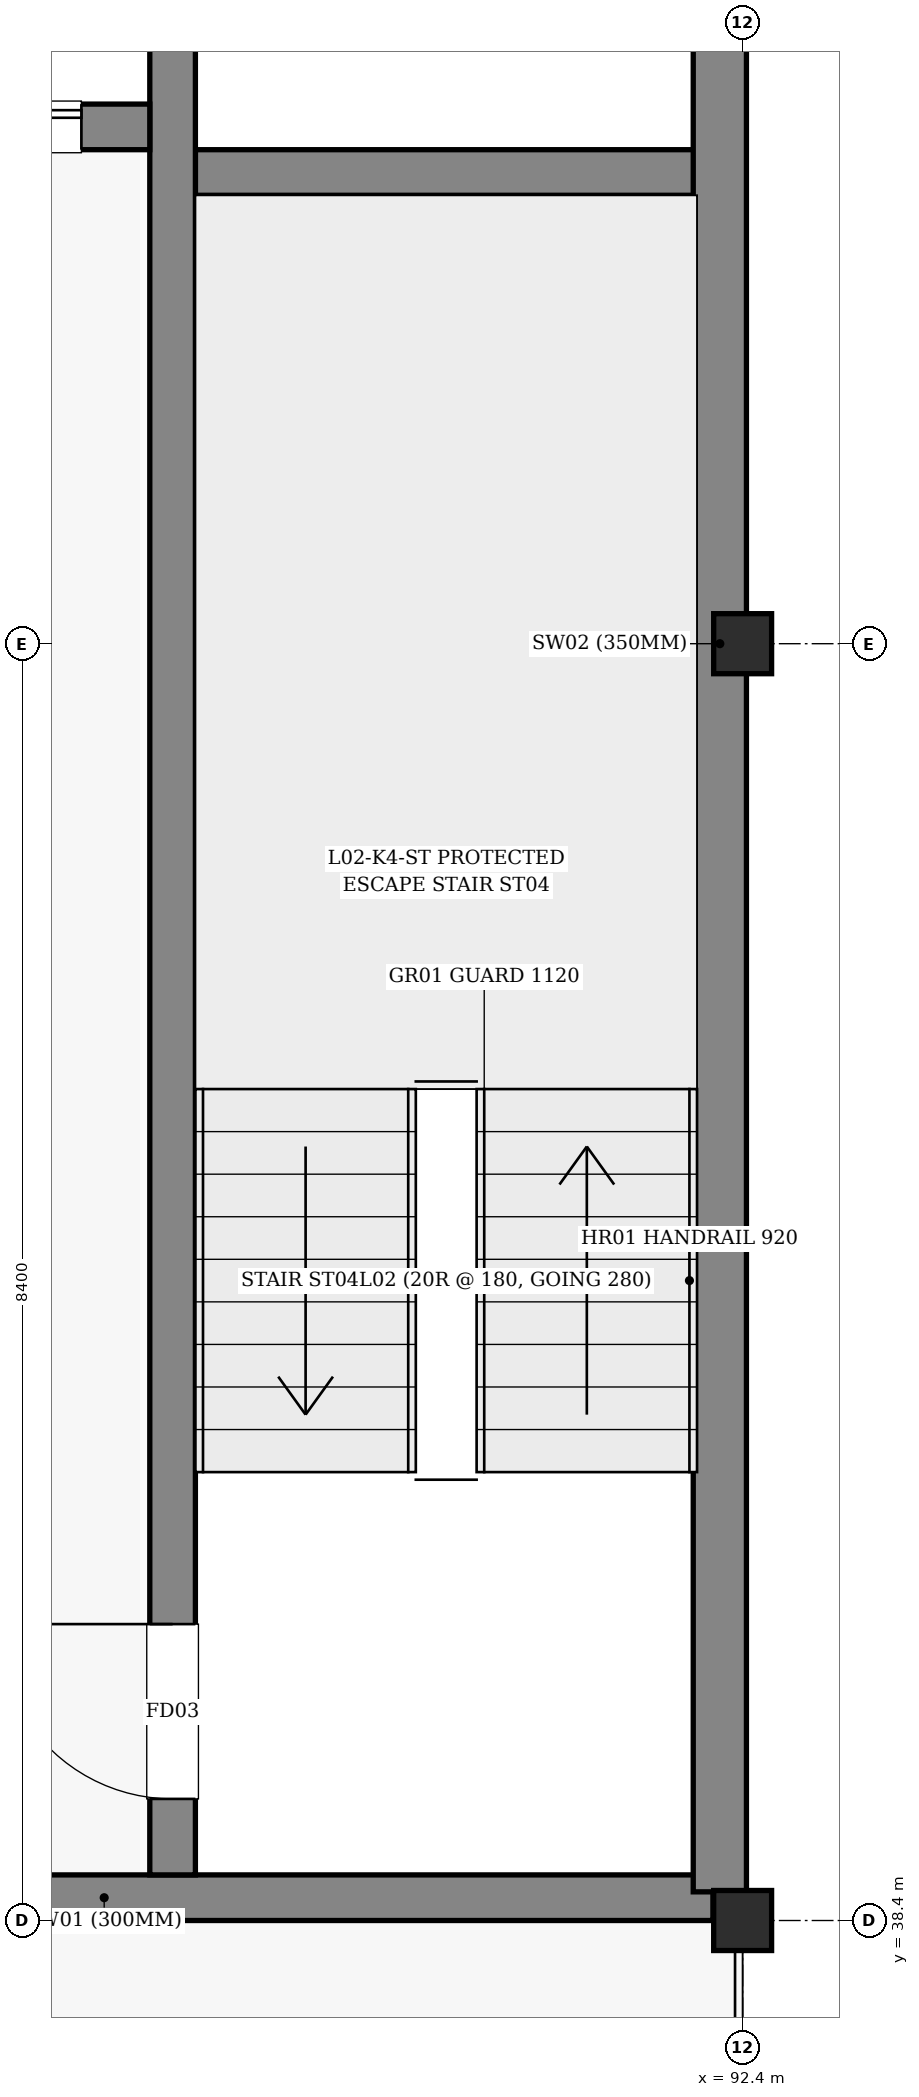
"""IFC4 building model, lengths in metres.
Left out: names, types, materials, properties, quantities, classifications, styles, units other than length and angle.
Written with IfcOpenShell. Run it as: python <this file> out.ifc"""

import sys

from ifc_helpers import new_model, si_unit, direction, frame, frame_2d, origin, origin_2d, place, context, subcontext, project, spatial, rectangle, i_section, extrude, element, fill, save


model = new_model("IFC4")
c1 = context("Model", 3, precision=1e-05, world=origin(), true_north=direction((0.0, 1.0)))
c2 = subcontext(c1, "Body", "Model", "MODEL_VIEW")
j1 = project(units=[si_unit("LENGTHUNIT", "METRE"), si_unit("PLANEANGLEUNIT", "RADIAN")], contexts=[c1])
p1 = place(None, origin())
s1 = spatial("IfcSite", under=j1, at=p1, CompositionType="ELEMENT")
p2 = place(p1, origin())
s2 = spatial("IfcBuilding", under=s1, at=p2, CompositionType="ELEMENT")
p3 = place(p2, frame((0.0, 0.0, 9.0)))
s3 = spatial("IfcBuildingStorey", under=s2, at=p3, CompositionType="ELEMENT", Elevation=9.0)
for number, where, z_axis, x_axis in (
    (1, (92.4, 38.4, 0.0), (0.0, 0.0, 1.0), (1.0, 0.0, 0.0)),
    (2, (92.4, 46.8, 0.0), (0.0, 0.0, 1.0), (1.0, 0.0, 0.0)),
):
    element("IfcColumn", number, at=place(p3, frame(where, z_axis=z_axis, x_axis=x_axis)), inside=s3, PredefinedType="COLUMN", context=c2, shape_type="SweptSolid", body=[
        extrude(i_section(OverallWidth=0.395, OverallDepth=0.381, WebThickness=0.018, FlangeThickness=0.03, FilletRadius=0.015, at=origin_2d()), origin(), (0.0, 0.0, 1.0), 3.6),
    ])
p4 = place(p3, frame((84.196, 38.55, 0.0), z_axis=(0.0, 0.0, 1.0), x_axis=(1.0, 0.0, 0.0)))
e3 = element("IfcWall", 3, at=p4, inside=s3, PredefinedType="SHEAR", context=c2, shape_type="SweptSolid", body=[
    extrude(rectangle(XDim=8.009, YDim=0.3, at=frame_2d((4.004, 0.0))), origin(), (0.0, 0.0, 1.0), 3.38),
])
p5 = place(p3, frame((88.8, 49.9, 0.0), z_axis=(0.0, 0.0, 1.0), x_axis=(1.0, 0.0, 0.0)))
e4 = element("IfcWall", 4, at=p5, inside=s3, PredefinedType="SHEAR", context=c2, shape_type="SweptSolid", body=[
    extrude(rectangle(XDim=3.3, YDim=0.3, at=frame_2d((1.65, 0.0))), origin(), (0.0, 0.0, 1.0), 3.38),
])
p6 = place(p3, frame((92.25, 38.588, 0.0), z_axis=(0.0, 0.0, 1.0), x_axis=(0.0, 1.0, 0.0)))
e5 = element("IfcWall", 5, at=p6, inside=s3, PredefinedType="SHEAR", context=c2, shape_type="SweptSolid", body=[
    extrude(rectangle(XDim=16.423, YDim=0.35, at=frame_2d((8.211, 0.0))), origin(), (0.0, 0.0, 1.0), 3.38),
])
p7 = place(p3, frame((88.65, 38.7, 0.0), z_axis=(0.0, 0.0, 1.0), x_axis=(0.0, 1.0, 0.0)))
e6 = element("IfcWall", 6, at=p7, inside=s3, PredefinedType="SHEAR", context=c2, shape_type="SweptSolid", body=[
    extrude(rectangle(XDim=16.2, YDim=0.3, at=frame_2d((8.1, 0.0))), origin(), (0.0, 0.0, 1.0), 3.38),
])
p8 = place(p7, frame((0.5, 0.0, 0.0)))
e7 = element("IfcOpeningElement", 7, at=p8, cuts=e6, PredefinedType="OPENING", context=c2, shape_type="SweptSolid", body=[
    extrude(rectangle(XDim=1.15, YDim=2.15, at=frame_2d((0.575, 1.075))), frame((0.0, 0.16, 0.0), z_axis=(0.0, -1.0, 0.0), x_axis=(1.0, 0.0, 0.0)), (0.0, 0.0, 1.0), 0.32),
])
p9 = place(p3, frame((86.3, 50.2, 0.0), z_axis=(0.0, 0.0, 1.0), x_axis=(1.0, 0.0, 0.0)))
e8 = element("IfcWall", 8, at=p9, inside=s3, PredefinedType="SHEAR", context=c2, shape_type="SweptSolid", body=[
    extrude(rectangle(XDim=2.2, YDim=0.3, at=frame_2d((1.1, 0.0))), origin(), (0.0, 0.0, 1.0), 3.38),
])
p10 = place(p9, frame((0.65, 0.0, 0.0)))
e9 = element("IfcOpeningElement", 9, at=p10, cuts=e8, PredefinedType="OPENING", context=c2, shape_type="SweptSolid", body=[
    extrude(rectangle(XDim=1.1, YDim=2.2, at=frame_2d((0.55, 1.1))), frame((0.0, 0.16, 0.0), z_axis=(0.0, -1.0, 0.0), x_axis=(1.0, 0.0, 0.0)), (0.0, 0.0, 1.0), 0.32),
])
p11 = place(p8, origin())
e10 = element("IfcDoor", 10, at=p11, inside=s3, OperationType="SINGLE_SWING_RIGHT", PredefinedType="DOOR", context=c2, shape_type="SweptSolid", body=[
    extrude(rectangle(XDim=1.15, YDim=2.15, at=frame_2d((0.575, 1.075))), frame((0.0, 0.025, 0.0), z_axis=(0.0, -1.0, 0.0), x_axis=(1.0, 0.0, 0.0)), (0.0, 0.0, 1.0), 0.05),
])
fill(e7, e10)
p12 = place(p10, origin())
e11 = element("IfcDoor", 11, at=p12, inside=s3, OperationType="SLIDING_TO_LEFT", PredefinedType="DOOR", context=c2, shape_type="SweptSolid", body=[
    extrude(rectangle(XDim=1.1, YDim=2.2, at=frame_2d((0.55, 1.1))), frame((0.0, 0.025, 0.0), z_axis=(0.0, -1.0, 0.0), x_axis=(1.0, 0.0, 0.0)), (0.0, 0.0, 1.0), 0.05),
])
fill(e9, e11)
save(model, sys.argv[1])
